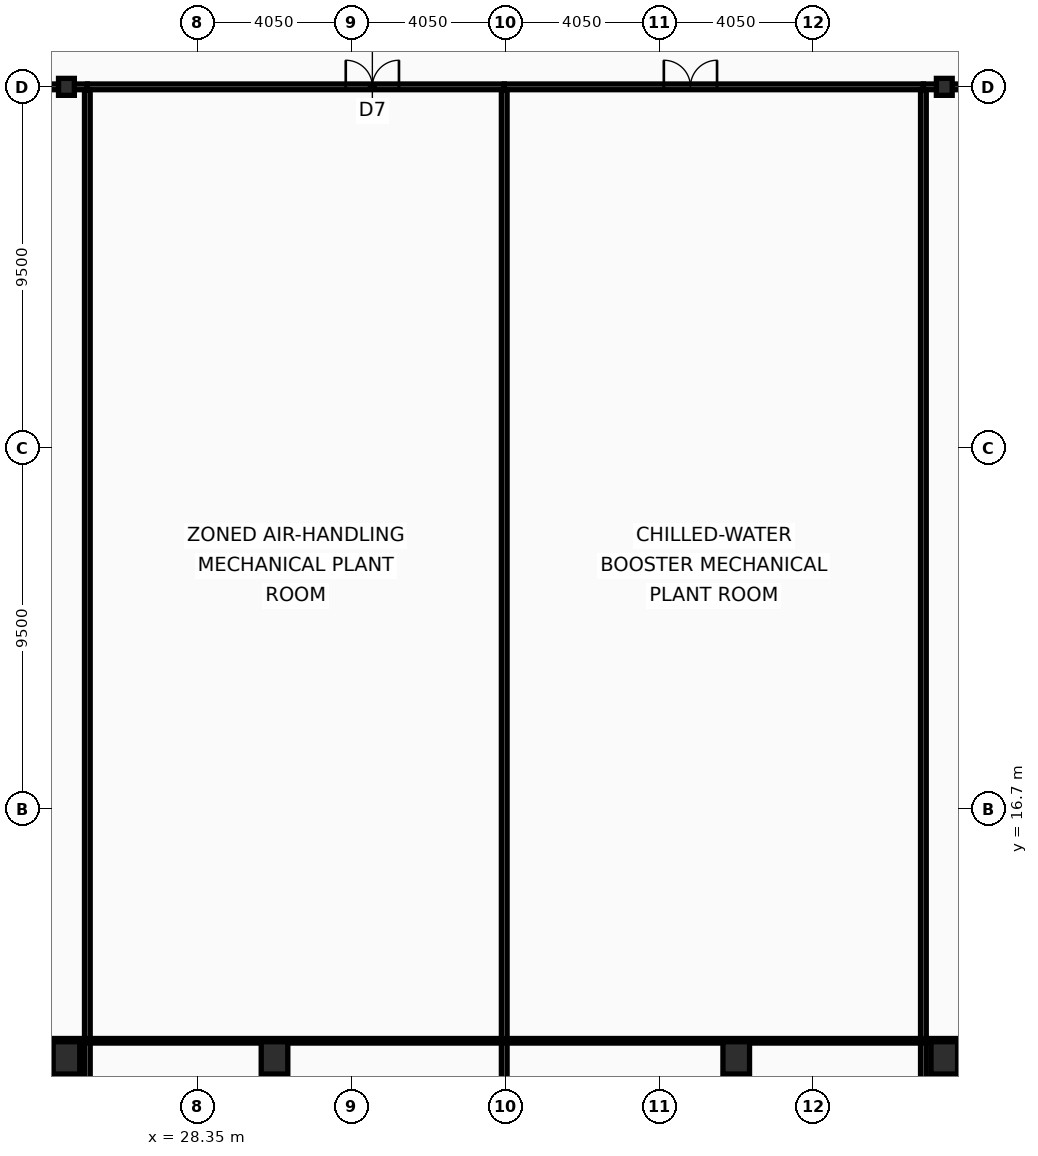
"""IFC4 building model, lengths in metres.
Left out: names, types, materials, properties, quantities, classifications, styles, units other than length and angle.
Written with IfcOpenShell. Run it as: python <this file> out.ifc"""

import sys

from ifc_helpers import new_model, si_unit, direction, frame, frame_2d, origin, origin_2d, place, context, subcontext, project, spatial, rectangle, hollow_rectangle, i_section, extrude, element, fill, save


model = new_model("IFC4")
c1 = context("Model", 3, precision=1e-05, world=origin(), true_north=direction((0.0, 1.0)))
c2 = subcontext(c1, "Body", "Model", "MODEL_VIEW")
j1 = project(units=[si_unit("LENGTHUNIT", "METRE"), si_unit("PLANEANGLEUNIT", "RADIAN")], contexts=[c1])
p1 = place(None, origin())
s1 = spatial("IfcSite", under=j1, at=p1, CompositionType="ELEMENT")
p2 = place(p1, origin())
s2 = spatial("IfcBuilding", under=s1, at=p2, CompositionType="ELEMENT")
p3 = place(p2, frame((0.0, 0.0, 172.2)))
s3 = spatial("IfcBuildingStorey", under=s2, at=p3, CompositionType="ELEMENT", Elevation=172.2)
for number, where, z_axis, x_axis in (
    (1, (24.9, 10.15, 0.0), (0.0, 0.0, 1.0), (1.0, 0.0, 0.0)),
    (2, (30.375, 10.15, 0.0), (0.0, 0.0, 1.0), (1.0, 0.0, 0.0)),
    (3, (42.525, 10.15, 0.0), (0.0, 0.0, 1.0), (1.0, 0.0, 0.0)),
    (4, (48.0, 10.15, 0.0), (0.0, 0.0, 1.0), (1.0, 0.0, 0.0)),
):
    element("IfcColumn", number, at=place(p3, frame(where, z_axis=z_axis, x_axis=x_axis)), inside=s3, PredefinedType="COLUMN", context=c2, shape_type="SweptSolid", body=[
        extrude(hollow_rectangle(XDim=0.7, YDim=0.85, WallThickness=0.05, at=origin_2d()), origin(), (0.0, 0.0, 1.0), 4.8),
    ])
for number, where, z_axis, x_axis in (
    (5, (24.9, 35.7, 0.0), (0.0, 0.0, 1.0), (1.0, 0.0, 0.0)),
    (6, (48.0, 35.7, 0.0), (0.0, 0.0, 1.0), (1.0, 0.0, 0.0)),
):
    element("IfcColumn", number, at=place(p3, frame(where, z_axis=z_axis, x_axis=x_axis)), inside=s3, PredefinedType="COLUMN", context=c2, shape_type="SweptSolid", body=[
        extrude(i_section(OverallWidth=0.416, OverallDepth=0.446, WebThickness=0.039, FlangeThickness=0.063, at=origin_2d()), origin(), (0.0, 0.0, 1.0), 4.8),
    ])
p4 = place(p3, frame((21.05, 35.7, 0.0), z_axis=(0.0, 0.0, 1.0), x_axis=(1.0, 0.0, 0.0)))
e7 = element("IfcWall", 7, at=p4, inside=s3, PredefinedType="PARTITIONING", context=c2, shape_type="SweptSolid", body=[
    extrude(rectangle(XDim=4.4, YDim=0.15, at=frame_2d((2.2, 0.0))), origin(), (0.0, 0.0, 1.0), 3.93),
])
p5 = place(p3, frame((25.45, 35.7, 0.0), z_axis=(0.0, 0.0, 1.0), x_axis=(1.0, 0.0, 0.0)))
e8 = element("IfcWall", 8, at=p5, inside=s3, PredefinedType="PARTITIONING", context=c2, shape_type="SweptSolid", body=[
    extrude(rectangle(XDim=10.97, YDim=0.15, at=frame_2d((5.485, 0.0))), origin(), (0.0, 0.0, 1.0), 3.93),
])
p6 = place(p5, frame((6.8, 0.0, 0.0)))
e9 = element("IfcOpeningElement", 9, at=p6, cuts=e8, PredefinedType="OPENING", context=c2, shape_type="SweptSolid", body=[
    extrude(rectangle(XDim=1.4, YDim=2.15, at=frame_2d((0.7, 1.075))), frame((0.0, 0.085, 0.0), z_axis=(0.0, -1.0, 0.0), x_axis=(1.0, 0.0, 0.0)), (0.0, 0.0, 1.0), 0.17),
])
p7 = place(p3, frame((36.42, 35.7, 0.0), z_axis=(0.0, 0.0, 1.0), x_axis=(1.0, 0.0, 0.0)))
e10 = element("IfcWall", 10, at=p7, inside=s3, PredefinedType="PARTITIONING", context=c2, shape_type="SweptSolid", body=[
    extrude(rectangle(XDim=11.03, YDim=0.15, at=frame_2d((5.515, 0.0))), origin(), (0.0, 0.0, 1.0), 3.93),
])
p8 = place(p7, frame((4.2, 0.0, 0.0)))
e11 = element("IfcOpeningElement", 11, at=p8, cuts=e10, PredefinedType="OPENING", context=c2, shape_type="SweptSolid", body=[
    extrude(rectangle(XDim=1.4, YDim=2.15, at=frame_2d((0.7, 1.075))), frame((0.0, 0.085, 0.0), z_axis=(0.0, -1.0, 0.0), x_axis=(1.0, 0.0, 0.0)), (0.0, 0.0, 1.0), 0.17),
])
p9 = place(p3, frame((47.45, 35.7, 0.0), z_axis=(0.0, 0.0, 1.0), x_axis=(1.0, 0.0, 0.0)))
e12 = element("IfcWall", 12, at=p9, inside=s3, PredefinedType="PARTITIONING", context=c2, shape_type="SweptSolid", body=[
    extrude(rectangle(XDim=4.4, YDim=0.15, at=frame_2d((2.2, 0.0))), origin(), (0.0, 0.0, 1.0), 3.93),
])
p10 = place(p3, frame((36.42, 8.32, 0.0), z_axis=(0.0, 0.0, 1.0), x_axis=(0.0, 1.0, 0.0)))
e13 = element("IfcWall", 13, at=p10, inside=s3, PredefinedType="PARTITIONING", context=c2, shape_type="SweptSolid", body=[
    extrude(rectangle(XDim=27.3, YDim=0.15, at=frame_2d((13.65, 0.0))), origin(), (0.0, 0.0, 1.0), 4.03),
])
for number, where, z_axis, x_axis in (
    (14, (25.45, 8.32, 0.0), (0.0, 0.0, 1.0), (0.0, 1.0, 0.0)),
    (15, (47.45, 8.32, 0.0), (0.0, 0.0, 1.0), (0.0, 1.0, 0.0)),
):
    element("IfcWall", number, at=place(p3, frame(where, z_axis=z_axis, x_axis=x_axis)), inside=s3, PredefinedType="PARTITIONING", context=c2, shape_type="SweptSolid", body=[
        extrude(rectangle(XDim=27.3, YDim=0.15, at=frame_2d((13.65, 0.0))), origin(), (0.0, 0.0, 1.0), 3.93),
    ])
p11 = place(p3, frame((6.095, 10.6, 0.0), z_axis=(0.0, 0.0, 1.0), x_axis=(1.0, 0.0, 0.0)))
e16 = element("IfcWall", 16, at=p11, inside=s3, PredefinedType="PARTITIONING", context=c2, shape_type="SweptSolid", body=[
    extrude(rectangle(XDim=60.71, YDim=0.12, at=frame_2d((30.355, 0.0))), origin(), (0.0, 0.0, 1.0), 3.93),
])
p12 = place(p6, origin())
e17 = element("IfcDoor", 17, at=p12, inside=s3, OperationType="DOUBLE_DOOR_SINGLE_SWING", PredefinedType="DOOR", context=c2, shape_type="SweptSolid", body=[
    extrude(rectangle(XDim=1.4, YDim=2.15, at=frame_2d((0.7, 1.075))), frame((0.0, 0.025, 0.0), z_axis=(0.0, -1.0, 0.0), x_axis=(1.0, 0.0, 0.0)), (0.0, 0.0, 1.0), 0.05),
])
fill(e9, e17)
p13 = place(p8, origin())
e18 = element("IfcDoor", 18, at=p13, inside=s3, OperationType="DOUBLE_DOOR_SINGLE_SWING", PredefinedType="DOOR", context=c2, shape_type="SweptSolid", body=[
    extrude(rectangle(XDim=1.4, YDim=2.15, at=frame_2d((0.7, 1.075))), frame((0.0, 0.025, 0.0), z_axis=(0.0, -1.0, 0.0), x_axis=(1.0, 0.0, 0.0)), (0.0, 0.0, 1.0), 0.05),
])
fill(e11, e18)
save(model, sys.argv[1])
